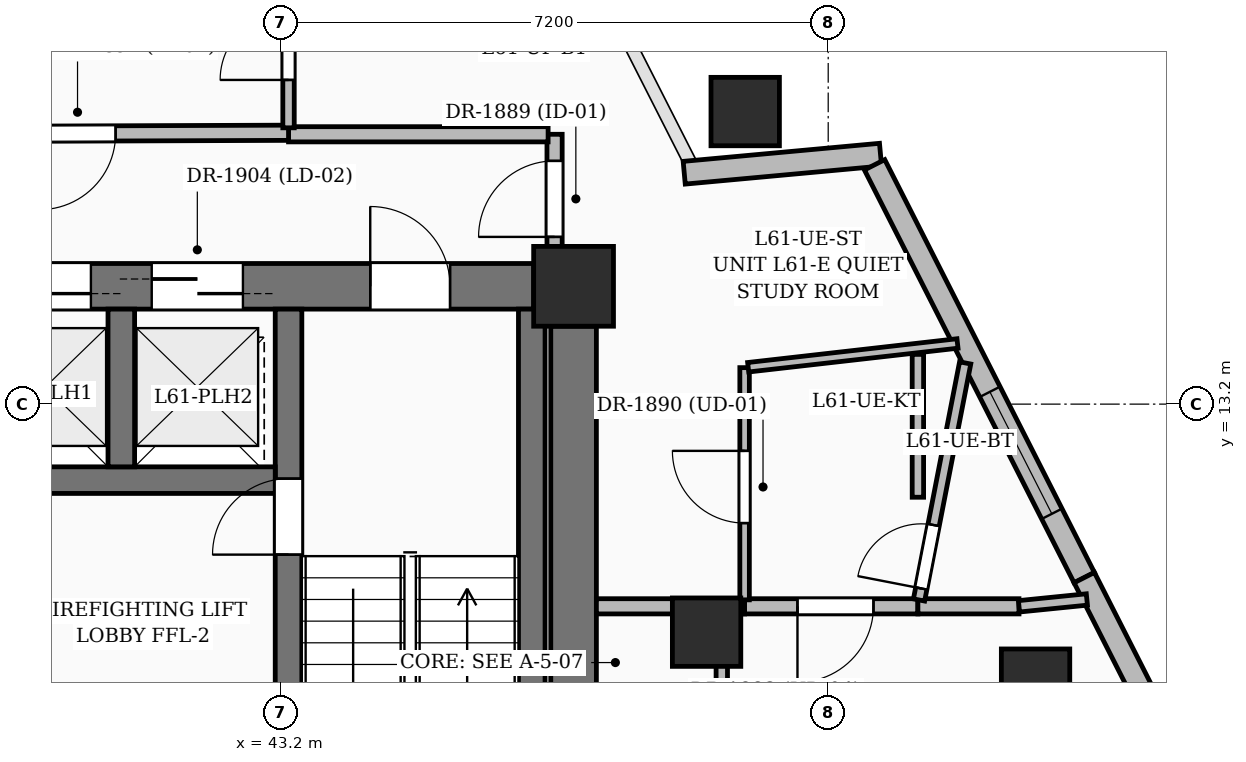
"""IFC4 building model, lengths in metres.
Left out: names, types, materials, properties, quantities, classifications, styles, units other than length and angle.
Written with IfcOpenShell. Run it as: python <this file> out.ifc"""

import sys

from ifc_helpers import new_model, si_unit, direction, frame, frame_2d, origin, origin_2d, place, context, subcontext, project, spatial, rectangle, extrude, element, fill, save


model = new_model("IFC4")
c1 = context("Model", 3, precision=1e-05, world=origin(), true_north=direction((0.0, 1.0)))
c2 = subcontext(c1, "Body", "Model", "MODEL_VIEW")
j1 = project(units=[si_unit("LENGTHUNIT", "METRE"), si_unit("PLANEANGLEUNIT", "RADIAN")], contexts=[c1])
p1 = place(None, origin())
s1 = spatial("IfcSite", under=j1, at=p1, CompositionType="ELEMENT")
p2 = place(p1, origin())
s2 = spatial("IfcBuilding", under=s1, at=p2, CompositionType="ELEMENT")
p3 = place(p2, frame((0.0, 0.0, 237.0)))
s3 = spatial("IfcBuildingStorey", under=s2, at=p3, CompositionType="ELEMENT", Elevation=237.0)
p4 = place(p3, frame((47.05, 14.75, 0.0), z_axis=(0.0, 0.0, 1.0), x_axis=(1.0, 0.0, 0.0)))
e1 = element("IfcColumn", 1, at=p4, inside=s3, PredefinedType="COLUMN", context=c2, shape_type="SweptSolid", body=[
    extrude(rectangle(XDim=1.05, YDim=1.05, at=origin_2d()), origin(), (0.0, 0.0, 1.0), 3.75),
])
p5 = place(p3, frame((48.8, 10.2, 0.0), z_axis=(0.0, 0.0, 1.0), x_axis=(1.0, 0.0, 0.0)))
e2 = element("IfcColumn", 2, at=p5, inside=s3, PredefinedType="COLUMN", context=c2, shape_type="SweptSolid", body=[
    extrude(rectangle(XDim=0.9, YDim=0.9, at=origin_2d()), origin(), (0.0, 0.0, 1.0), 3.75),
])
p6 = place(p3, frame((35.675, 14.75, 0.0), z_axis=(0.0, 0.0, 1.0), x_axis=(1.0, 0.0, 0.0)))
e3 = element("IfcWall", 3, at=p6, inside=s3, PredefinedType="SHEAR", context=c2, shape_type="SweptSolid", body=[
    extrude(rectangle(XDim=10.85, YDim=0.6, at=frame_2d((5.425, 0.0))), origin(), (0.0, 0.0, 1.0), 3.75),
])
p7 = place(p6, frame((1.1, 0.0, 0.0)))
e4 = element("IfcOpeningElement", 4, at=p7, cuts=e3, PredefinedType="OPENING", context=c2, shape_type="SweptSolid", body=[
    extrude(rectangle(XDim=1.05, YDim=2.15, at=frame_2d((0.525, 1.075))), frame((0.0, 0.31, 0.0), z_axis=(0.0, -1.0, 0.0), x_axis=(1.0, 0.0, 0.0)), (0.0, 0.0, 1.0), 0.62),
])
p8 = place(p6, frame((8.7, 0.0, 0.0)))
e5 = element("IfcOpeningElement", 5, at=p8, cuts=e3, PredefinedType="OPENING", context=c2, shape_type="SweptSolid", body=[
    extrude(rectangle(XDim=1.05, YDim=2.15, at=frame_2d((0.525, 1.075))), frame((0.0, 0.31, 0.0), z_axis=(0.0, -1.0, 0.0), x_axis=(1.0, 0.0, 0.0)), (0.0, 0.0, 1.0), 0.62),
])
p9 = place(p6, frame((3.825, 0.0, 0.0)))
e6 = element("IfcOpeningElement", 6, at=p9, cuts=e3, PredefinedType="OPENING", context=c2, shape_type="SweptSolid", body=[
    extrude(rectangle(XDim=1.2, YDim=2.2, at=frame_2d((0.6, 1.1))), frame((0.0, 0.31, 0.0), z_axis=(0.0, -1.0, 0.0), x_axis=(1.0, 0.0, 0.0)), (0.0, 0.0, 1.0), 0.62),
])
p10 = place(p6, frame((5.825, 0.0, 0.0)))
e7 = element("IfcOpeningElement", 7, at=p10, cuts=e3, PredefinedType="OPENING", context=c2, shape_type="SweptSolid", body=[
    extrude(rectangle(XDim=1.2, YDim=2.2, at=frame_2d((0.6, 1.1))), frame((0.0, 0.31, 0.0), z_axis=(0.0, -1.0, 0.0), x_axis=(1.0, 0.0, 0.0)), (0.0, 0.0, 1.0), 0.62),
])
p11 = place(p3, frame((47.05, 5.075, 0.0), z_axis=(0.0, 0.0, 1.0), x_axis=(0.0, 1.0, 0.0)))
e8 = element("IfcWall", 8, at=p11, inside=s3, PredefinedType="SHEAR", context=c2, shape_type="SweptSolid", body=[
    extrude(rectangle(XDim=9.15, YDim=0.6, at=frame_2d((4.575, 0.0))), origin(), (0.0, 0.0, 1.0), 3.75),
])
p12 = place(p3, frame((43.3, 5.2, 0.0), z_axis=(0.0, 0.0, 1.0), x_axis=(0.0, 1.0, 0.0)))
e9 = element("IfcWall", 9, at=p12, inside=s3, PredefinedType="SOLIDWALL", context=c2, shape_type="SweptSolid", body=[
    extrude(rectangle(XDim=9.25, YDim=0.35, at=frame_2d((4.625, 0.0))), origin(), (0.0, 0.0, 1.0), 3.75),
])
p13 = place(p12, frame((6.02, 0.0, 0.0)))
e10 = element("IfcOpeningElement", 10, at=p13, cuts=e9, PredefinedType="OPENING", context=c2, shape_type="SweptSolid", body=[
    extrude(rectangle(XDim=1.0, YDim=2.15, at=frame_2d((0.5, 1.075))), frame((0.0, 0.185, 0.0), z_axis=(0.0, -1.0, 0.0), x_axis=(1.0, 0.0, 0.0)), (0.0, 0.0, 1.0), 0.37),
])
p14 = place(p3, frame((46.5, 5.2, 0.0), z_axis=(0.0, 0.0, 1.0), x_axis=(0.0, 1.0, 0.0)))
e11 = element("IfcWall", 11, at=p14, inside=s3, PredefinedType="SOLIDWALL", context=c2, shape_type="SweptSolid", body=[
    extrude(rectangle(XDim=9.25, YDim=0.35, at=frame_2d((4.625, 0.0))), origin(), (0.0, 0.0, 1.0), 3.75),
])
p15 = place(p3, frame((39.075, 12.2, 0.0), z_axis=(0.0, 0.0, 1.0), x_axis=(1.0, 0.0, 0.0)))
e12 = element("IfcWall", 12, at=p15, inside=s3, PredefinedType="SOLIDWALL", context=c2, shape_type="SweptSolid", body=[
    extrude(rectangle(XDim=4.05, YDim=0.35, at=frame_2d((2.025, 0.0))), origin(), (0.0, 0.0, 1.0), 3.75),
])
p16 = place(p3, frame((41.1, 12.375, 0.0), z_axis=(0.0, 0.0, 1.0), x_axis=(0.0, 1.0, 0.0)))
e13 = element("IfcWall", 13, at=p16, inside=s3, PredefinedType="SOLIDWALL", context=c2, shape_type="SweptSolid", body=[
    extrude(rectangle(XDim=2.075, YDim=0.35, at=frame_2d((1.038, 0.0))), origin(), (0.0, 0.0, 1.0), 3.75),
])
for number, where, z_axis, x_axis in (
    (14, (53.128, 9.529, 0.0), (0.0, 0.0, 1.0), (1.0, 0.0, 0.0)),
    (15, (49.308, 17.049, 0.0), (0.0, 0.0, 1.0), (1.0, 0.0, 0.0)),
):
    element("IfcColumn", number, at=place(p3, frame(where, z_axis=z_axis, x_axis=x_axis)), inside=s3, PredefinedType="COLUMN", context=c2, shape_type="SweptSolid", body=[
        extrude(rectangle(XDim=0.9, YDim=0.9, at=origin_2d()), origin(), (0.0, 0.0, 1.0), 3.75),
    ])
p17 = place(p3, frame((48.506, 16.244, 0.0), z_axis=(0.0, 0.0, 1.0), x_axis=(0.995796977709, 0.091588095218, 0.0)))
e16 = element("IfcWall", 16, at=p17, inside=s3, PredefinedType="SOLIDWALL", context=c2, shape_type="SweptSolid", body=[
    extrude(rectangle(XDim=2.594, YDim=0.3, at=frame_2d((1.297, 0.0))), origin(), (0.0, 0.0, 1.0), 2.69),
])
p18 = place(p3, frame((51.01, 16.349, 0.0), z_axis=(0.0, 0.0, 1.0), x_axis=(0.452847757291, -0.891587858103, 0.0)))
e17 = element("IfcWall", 17, at=p18, inside=s3, PredefinedType="SOLIDWALL", context=c2, shape_type="SweptSolid", body=[
    extrude(rectangle(XDim=6.092, YDim=0.3, at=frame_2d((3.046, 0.0))), origin(), (0.0, 0.0, 1.0), 3.5),
])
p19 = place(p18, frame((3.35, 0.0, 0.6)))
e18 = element("IfcOpeningElement", 18, at=p19, cuts=e17, PredefinedType="OPENING", context=c2, shape_type="SweptSolid", body=[
    extrude(rectangle(XDim=1.8, YDim=2.1, at=frame_2d((0.9, 1.05))), frame((0.0, 0.16, 0.0), z_axis=(0.0, -1.0, 0.0), x_axis=(1.0, 0.0, 0.0)), (0.0, 0.0, 1.0), 0.32),
])
p20 = place(p3, frame((53.769, 10.917, 0.0), z_axis=(0.0, 0.0, 1.0), x_axis=(0.452819004825, -0.891602461229, 0.0)))
e19 = element("IfcWall", 19, at=p20, inside=s3, PredefinedType="SOLIDWALL", context=c2, shape_type="SweptSolid", body=[
    extrude(rectangle(XDim=6.366, YDim=0.3, at=frame_2d((3.183, 0.0))), origin(), (0.0, 0.0, 1.0), 3.5),
])
p21 = place(p20, frame((3.35, 0.0, 0.55)))
e20 = element("IfcOpeningElement", 20, at=p21, cuts=e19, PredefinedType="OPENING", context=c2, shape_type="SweptSolid", body=[
    extrude(rectangle(XDim=1.6, YDim=2.2, at=frame_2d((0.8, 1.1))), frame((0.0, 0.16, 0.0), z_axis=(0.0, -1.0, 0.0), x_axis=(1.0, 0.0, 0.0)), (0.0, 0.0, 1.0), 0.32),
])
p22 = place(p3, frame((46.8, 15.05, 0.0), z_axis=(0.0, 0.0, 1.0), x_axis=(0.0, 1.0, 0.0)))
e21 = element("IfcWall", 21, at=p22, inside=s3, PredefinedType="PARTITIONING", context=c2, shape_type="SweptSolid", body=[
    extrude(rectangle(XDim=1.7, YDim=0.2, at=frame_2d((0.85, 0.0))), origin(), (0.0, 0.0, 1.0), 2.685),
])
p23 = place(p22, frame((0.35, 0.0, 0.0)))
e22 = element("IfcOpeningElement", 22, at=p23, cuts=e21, PredefinedType="OPENING", context=c2, shape_type="SweptSolid", body=[
    extrude(rectangle(XDim=1.0, YDim=2.2, at=frame_2d((0.5, 1.1))), frame((0.0, 0.11, 0.0), z_axis=(0.0, -1.0, 0.0), x_axis=(1.0, 0.0, 0.0)), (0.0, 0.0, 1.0), 0.22),
])
p24 = place(p3, frame((46.715, 16.75, 0.0), z_axis=(0.0, 0.0, 1.0), x_axis=(-1.0, 0.0, 0.0)))
e23 = element("IfcWall", 23, at=p24, inside=s3, PredefinedType="PARTITIONING", context=c2, shape_type="SweptSolid", body=[
    extrude(rectangle(XDim=3.415, YDim=0.2, at=frame_2d((1.708, 0.0))), origin(), (0.0, 0.0, 1.0), 2.685),
])
p25 = place(p3, frame((43.3, 16.77, 0.0), z_axis=(0.0, 0.0, 1.0), x_axis=(-0.999993494511, -0.003607067547, 0.0)))
e24 = element("IfcWall", 24, at=p25, inside=s3, PredefinedType="PARTITIONING", context=c2, shape_type="SweptSolid", body=[
    extrude(rectangle(XDim=5.55, YDim=0.2, at=frame_2d((2.775, 0.0))), origin(), (0.0, 0.0, 1.0), 3.5),
])
p26 = place(p25, frame((2.275, 0.0, 0.0)))
e25 = element("IfcOpeningElement", 25, at=p26, cuts=e24, PredefinedType="OPENING", context=c2, shape_type="SweptSolid", body=[
    extrude(rectangle(XDim=1.0, YDim=2.2, at=frame_2d((0.5, 1.1))), frame((0.0, 0.11, 0.0), z_axis=(0.0, -1.0, 0.0), x_axis=(1.0, 0.0, 0.0)), (0.0, 0.0, 1.0), 0.22),
])
p27 = place(p3, frame((49.0, 10.54, 0.0), z_axis=(0.0, 0.0, 1.0), x_axis=(0.0, -1.0, 0.0)))
e26 = element("IfcWall", 26, at=p27, inside=s3, PredefinedType="PARTITIONING", context=c2, shape_type="SweptSolid", body=[
    extrude(rectangle(XDim=4.15, YDim=0.15, at=frame_2d((2.075, 0.0))), origin(), (0.0, 0.0, 1.0), 3.5),
])
p28 = place(p27, frame((1.65, 0.0, 0.0)))
e27 = element("IfcOpeningElement", 27, at=p28, cuts=e26, PredefinedType="OPENING", context=c2, shape_type="SweptSolid", body=[
    extrude(rectangle(XDim=0.85, YDim=2.1, at=frame_2d((0.425, 1.05))), frame((0.0, 0.085, 0.0), z_axis=(0.0, -1.0, 0.0), x_axis=(1.0, 0.0, 0.0)), (0.0, 0.0, 1.0), 0.17),
])
p29 = place(p3, frame((49.3, 10.54, 0.0), z_axis=(0.0, 0.0, 1.0), x_axis=(-1.0, 0.0, 0.0)))
e28 = element("IfcWall", 28, at=p29, inside=s3, PredefinedType="PARTITIONING", context=c2, shape_type="SweptSolid", body=[
    extrude(rectangle(XDim=0.3, YDim=0.2, at=frame_2d((0.15, 0.0))), origin(), (0.0, 0.0, 1.0), 3.5),
])
p30 = place(p3, frame((51.58, 10.54, 0.0), z_axis=(0.0, 0.0, 1.0), x_axis=(-1.0, 0.0, 0.0)))
e29 = element("IfcWall", 29, at=p30, inside=s3, PredefinedType="PARTITIONING", context=c2, shape_type="SweptSolid", body=[
    extrude(rectangle(XDim=2.28, YDim=0.2, at=frame_2d((1.14, 0.0))), origin(), (0.0, 0.0, 1.0), 3.16),
])
p31 = place(p30, frame((0.584, 0.0, 0.0)))
e30 = element("IfcOpeningElement", 30, at=p31, cuts=e29, PredefinedType="OPENING", context=c2, shape_type="SweptSolid", body=[
    extrude(rectangle(XDim=1.0, YDim=2.2, at=frame_2d((0.5, 1.1))), frame((0.0, 0.11, 0.0), z_axis=(0.0, -1.0, 0.0), x_axis=(1.0, 0.0, 0.0)), (0.0, 0.0, 1.0), 0.22),
])
p32 = place(p3, frame((52.91, 10.54, 0.0), z_axis=(0.0, 0.0, 1.0), x_axis=(-1.0, 0.0, 0.0)))
e31 = element("IfcWall", 31, at=p32, inside=s3, PredefinedType="PARTITIONING", context=c2, shape_type="SweptSolid", body=[
    extrude(rectangle(XDim=1.33, YDim=0.2, at=frame_2d((0.665, 0.0))), origin(), (0.0, 0.0, 1.0), 2.82),
])
p33 = place(p3, frame((48.94, 10.54, 0.0), z_axis=(0.0, 0.0, 1.0), x_axis=(-1.0, 0.0, 0.0)))
e32 = element("IfcWall", 32, at=p33, inside=s3, PredefinedType="PARTITIONING", context=c2, shape_type="SweptSolid", body=[
    extrude(rectangle(XDim=1.59, YDim=0.2, at=frame_2d((0.795, 0.0))), origin(), (0.0, 0.0, 1.0), 3.5),
])
p34 = place(p3, frame((49.3, 10.625, 0.0), z_axis=(0.0, 0.0, 1.0), x_axis=(0.0, 1.0, 0.0)))
e33 = element("IfcWall", 33, at=p34, inside=s3, PredefinedType="PARTITIONING", context=c2, shape_type="SweptSolid", body=[
    extrude(rectangle(XDim=3.055, YDim=0.125, at=frame_2d((1.527, 0.0))), origin(), (0.0, 0.0, 1.0), 3.16),
])
p35 = place(p34, frame((1.01, 0.0, 0.0)))
e34 = element("IfcOpeningElement", 34, at=p35, cuts=e33, PredefinedType="OPENING", context=c2, shape_type="SweptSolid", body=[
    extrude(rectangle(XDim=0.95, YDim=2.2, at=frame_2d((0.475, 1.1))), frame((0.0, 0.072, 0.0), z_axis=(0.0, -1.0, 0.0), x_axis=(1.0, 0.0, 0.0)), (0.0, 0.0, 1.0), 0.145),
])
p36 = place(p3, frame((49.347, 13.685, 0.0), z_axis=(0.0, 0.0, 1.0), x_axis=(0.993613337674, 0.112838535954, 0.0)))
e35 = element("IfcWall", 35, at=p36, inside=s3, PredefinedType="PARTITIONING", context=c2, shape_type="SweptSolid", body=[
    extrude(rectangle(XDim=2.772, YDim=0.125, at=frame_2d((1.386, 0.0))), origin(), (0.0, 0.0, 1.0), 2.82),
])
p37 = place(p3, frame((51.595, 10.624, 0.0), z_axis=(0.0, 0.0, 1.0), x_axis=(0.190970447777, 0.981595786501, 0.0)))
e36 = element("IfcWall", 36, at=p37, inside=s3, PredefinedType="PARTITIONING", context=c2, shape_type="SweptSolid", body=[
    extrude(rectangle(XDim=3.177, YDim=0.15, at=frame_2d((1.588, 0.0))), origin(), (0.0, 0.0, 1.0), 2.82),
])
p38 = place(p37, frame((0.154, 0.0, 0.0)))
e37 = element("IfcOpeningElement", 37, at=p38, cuts=e36, PredefinedType="OPENING", context=c2, shape_type="SweptSolid", body=[
    extrude(rectangle(XDim=0.85, YDim=2.1, at=frame_2d((0.425, 1.05))), frame((0.0, 0.085, 0.0), z_axis=(0.0, -1.0, 0.0), x_axis=(1.0, 0.0, 0.0)), (0.0, 0.0, 1.0), 0.17),
])
p39 = place(p3, frame((43.3, 16.835, 0.0), z_axis=(0.0, 0.0, 1.0), x_axis=(0.0, 1.0, 0.0)))
e38 = element("IfcWall", 38, at=p39, inside=s3, PredefinedType="PARTITIONING", context=c2, shape_type="SweptSolid", body=[
    extrude(rectangle(XDim=2.177, YDim=0.15, at=frame_2d((1.089, 0.0))), origin(), (0.0, 0.0, 1.0), 3.5),
])
p40 = place(p39, frame((0.63, 0.0, 0.0)))
e39 = element("IfcOpeningElement", 39, at=p40, cuts=e38, PredefinedType="OPENING", context=c2, shape_type="SweptSolid", body=[
    extrude(rectangle(XDim=0.9, YDim=2.15, at=frame_2d((0.45, 1.075))), frame((0.0, 0.085, 0.0), z_axis=(0.0, -1.0, 0.0), x_axis=(1.0, 0.0, 0.0)), (0.0, 0.0, 1.0), 0.17),
])
p41 = place(p3, frame((52.91, 10.54, 0.0), z_axis=(0.0, 0.0, 1.0), x_axis=(0.994977766191, 0.100096177681, 0.0)))
e40 = element("IfcWall", 40, at=p41, inside=s3, PredefinedType="PARTITIONING", context=c2, shape_type="SweptSolid", body=[
    extrude(rectangle(XDim=0.897, YDim=0.15, at=frame_2d((0.449, 0.0))), origin(), (0.0, 0.0, 1.0), 3.5),
])
p42 = place(p3, frame((51.58, 11.975, 0.0), z_axis=(0.0, 0.0, 1.0), x_axis=(0.0, 1.0, 0.0)))
e41 = element("IfcWall", 41, at=p42, inside=s3, PredefinedType="PARTITIONING", context=c2, shape_type="SweptSolid", body=[
    extrude(rectangle(XDim=1.88, YDim=0.15, at=frame_2d((0.94, 0.0))), origin(), (0.0, 0.0, 1.0), 3.5),
])
p43 = place(p19, origin())
e42 = element("IfcWindow", 42, at=p43, inside=s3, PartitioningType="SINGLE_PANEL", PredefinedType="WINDOW", context=c2, shape_type="SweptSolid", body=[
    extrude(rectangle(XDim=1.8, YDim=2.1, at=frame_2d((0.9, 1.05))), frame((0.0, 0.03, 0.0), z_axis=(0.0, -1.0, 0.0), x_axis=(1.0, 0.0, 0.0)), (0.0, 0.0, 1.0), 0.06),
])
fill(e18, e42)
p44 = place(p8, origin())
e43 = element("IfcDoor", 43, at=p44, inside=s3, OperationType="SINGLE_SWING_LEFT", PredefinedType="DOOR", context=c2, shape_type="SweptSolid", body=[
    extrude(rectangle(XDim=1.05, YDim=2.15, at=frame_2d((0.525, 1.075))), frame((0.0, 0.025, 0.0), z_axis=(0.0, -1.0, 0.0), x_axis=(1.0, 0.0, 0.0)), (0.0, 0.0, 1.0), 0.05),
])
fill(e5, e43)
p45 = place(p13, origin())
e44 = element("IfcDoor", 44, at=p45, inside=s3, OperationType="SINGLE_SWING_LEFT", PredefinedType="DOOR", context=c2, shape_type="SweptSolid", body=[
    extrude(rectangle(XDim=1.0, YDim=2.15, at=frame_2d((0.5, 1.075))), frame((0.0, 0.025, 0.0), z_axis=(0.0, -1.0, 0.0), x_axis=(1.0, 0.0, 0.0)), (0.0, 0.0, 1.0), 0.05),
])
fill(e10, e44)
p46 = place(p9, origin())
e45 = element("IfcDoor", 45, at=p46, inside=s3, OperationType="DOUBLE_DOOR_SLIDING", PredefinedType="DOOR", context=c2, shape_type="SweptSolid", body=[
    extrude(rectangle(XDim=1.2, YDim=2.2, at=frame_2d((0.6, 1.1))), frame((0.0, 0.025, 0.0), z_axis=(0.0, -1.0, 0.0), x_axis=(1.0, 0.0, 0.0)), (0.0, 0.0, 1.0), 0.05),
])
fill(e6, e45)
p47 = place(p10, origin())
e46 = element("IfcDoor", 46, at=p47, inside=s3, OperationType="DOUBLE_DOOR_SLIDING", PredefinedType="DOOR", context=c2, shape_type="SweptSolid", body=[
    extrude(rectangle(XDim=1.2, YDim=2.2, at=frame_2d((0.6, 1.1))), frame((0.0, 0.025, 0.0), z_axis=(0.0, -1.0, 0.0), x_axis=(1.0, 0.0, 0.0)), (0.0, 0.0, 1.0), 0.05),
])
fill(e7, e46)
p48 = place(p23, origin())
e47 = element("IfcDoor", 47, at=p48, inside=s3, OperationType="SINGLE_SWING_LEFT", PredefinedType="DOOR", context=c2, shape_type="SweptSolid", body=[
    extrude(rectangle(XDim=1.0, YDim=2.2, at=frame_2d((0.5, 1.1))), frame((0.0, 0.025, 0.0), z_axis=(0.0, -1.0, 0.0), x_axis=(1.0, 0.0, 0.0)), (0.0, 0.0, 1.0), 0.05),
])
fill(e22, e47)
p49 = place(p35, origin())
e48 = element("IfcDoor", 48, at=p49, inside=s3, OperationType="SINGLE_SWING_RIGHT", PredefinedType="DOOR", context=c2, shape_type="SweptSolid", body=[
    extrude(rectangle(XDim=0.95, YDim=2.2, at=frame_2d((0.475, 1.1))), frame((0.0, 0.025, 0.0), z_axis=(0.0, -1.0, 0.0), x_axis=(1.0, 0.0, 0.0)), (0.0, 0.0, 1.0), 0.05),
])
fill(e34, e48)
p50 = place(p38, origin())
e49 = element("IfcDoor", 49, at=p50, inside=s3, OperationType="SINGLE_SWING_LEFT", PredefinedType="DOOR", context=c2, shape_type="SweptSolid", body=[
    extrude(rectangle(XDim=0.85, YDim=2.1, at=frame_2d((0.425, 1.05))), frame((0.0, 0.025, 0.0), z_axis=(0.0, -1.0, 0.0), x_axis=(1.0, 0.0, 0.0)), (0.0, 0.0, 1.0), 0.05),
])
fill(e37, e49)
p51 = place(p26, origin())
e50 = element("IfcDoor", 50, at=p51, inside=s3, OperationType="SINGLE_SWING_RIGHT", PredefinedType="DOOR", context=c2, shape_type="SweptSolid", body=[
    extrude(rectangle(XDim=1.0, YDim=2.2, at=frame_2d((0.5, 1.1))), frame((0.0, 0.025, 0.0), z_axis=(0.0, -1.0, 0.0), x_axis=(1.0, 0.0, 0.0)), (0.0, 0.0, 1.0), 0.05),
])
fill(e25, e50)
p52 = place(p40, origin())
e51 = element("IfcDoor", 51, at=p52, inside=s3, OperationType="SINGLE_SWING_LEFT", PredefinedType="DOOR", context=c2, shape_type="SweptSolid", body=[
    extrude(rectangle(XDim=0.9, YDim=2.15, at=frame_2d((0.45, 1.075))), frame((0.0, 0.025, 0.0), z_axis=(0.0, -1.0, 0.0), x_axis=(1.0, 0.0, 0.0)), (0.0, 0.0, 1.0), 0.05),
])
fill(e39, e51)
p53 = place(p31, origin())
e52 = element("IfcDoor", 52, at=p53, inside=s3, OperationType="SINGLE_SWING_RIGHT", PredefinedType="DOOR", context=c2, shape_type="SweptSolid", body=[
    extrude(rectangle(XDim=1.0, YDim=2.2, at=frame_2d((0.5, 1.1))), frame((0.0, 0.025, 0.0), z_axis=(0.0, -1.0, 0.0), x_axis=(1.0, 0.0, 0.0)), (0.0, 0.0, 1.0), 0.05),
])
fill(e30, e52)
save(model, sys.argv[1])
